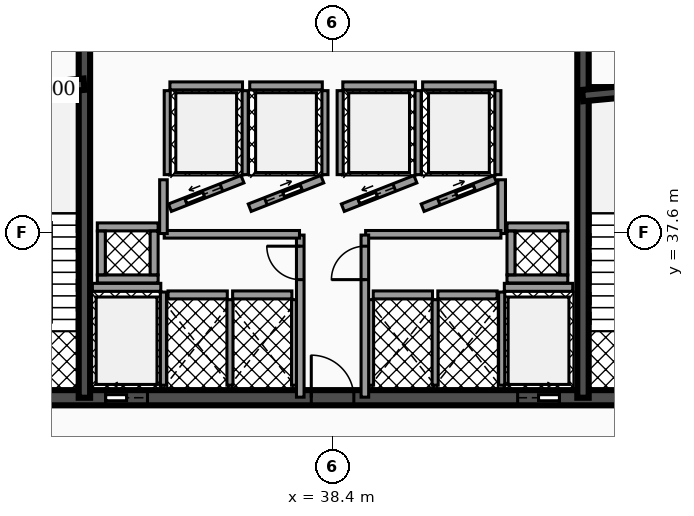
"""IFC4 building model, lengths in metres.
Left out: names, types, materials, properties, quantities, classifications, styles, units other than length and angle.
Written with IfcOpenShell. Run it as: python <this file> out.ifc"""

import sys

from ifc_helpers import new_model, si_unit, direction, frame, frame_2d, origin, place, context, subcontext, project, spatial, rectangle, extrude, element, fill, save


model = new_model("IFC4")
c1 = context("Model", 3, precision=1e-05, world=origin(), true_north=direction((0.0, 1.0)))
c2 = subcontext(c1, "Body", "Model", "MODEL_VIEW")
j1 = project(units=[si_unit("LENGTHUNIT", "METRE"), si_unit("PLANEANGLEUNIT", "RADIAN")], contexts=[c1])
p1 = place(None, origin())
s1 = spatial("IfcSite", under=j1, at=p1, CompositionType="ELEMENT")
p2 = place(p1, origin())
s2 = spatial("IfcBuilding", under=s1, at=p2, CompositionType="ELEMENT")
p3 = place(p2, frame((0.0, 0.0, 56.1)))
s3 = spatial("IfcBuildingStorey", under=s2, at=p3, CompositionType="ELEMENT", Elevation=56.1)
p4 = place(p3, frame((28.4, 33.25, 0.0), z_axis=(0.0, 0.0, 1.0), x_axis=(1.0, 0.0, 0.0)))
e1 = element("IfcWall", 1, at=p4, inside=s3, PredefinedType="SHEAR", context=c2, shape_type="SweptSolid", body=[
    extrude(rectangle(XDim=20.06, YDim=0.4, at=frame_2d((10.03, 0.0))), origin(), (0.0, 0.0, 1.0), 3.82),
])
p5 = place(p4, frame((4.03, 0.0, 0.0)))
e2 = element("IfcOpeningElement", 2, at=p5, cuts=e1, PredefinedType="OPENING", context=c2, shape_type="SweptSolid", body=[
    extrude(rectangle(XDim=1.1, YDim=2.15, at=frame_2d((0.55, 1.075))), frame((0.0, 0.21, 0.0), z_axis=(0.0, -1.0, 0.0), x_axis=(1.0, 0.0, 0.0)), (0.0, 0.0, 1.0), 0.42),
])
p6 = place(p4, frame((14.87, 0.0, 0.0)))
e3 = element("IfcOpeningElement", 3, at=p6, cuts=e1, PredefinedType="OPENING", context=c2, shape_type="SweptSolid", body=[
    extrude(rectangle(XDim=1.1, YDim=2.15, at=frame_2d((0.55, 1.075))), frame((0.0, 0.21, 0.0), z_axis=(0.0, -1.0, 0.0), x_axis=(1.0, 0.0, 0.0)), (0.0, 0.0, 1.0), 0.42),
])
p7 = place(p4, frame((1.31, 0.0, 0.0)))
e4 = element("IfcOpeningElement", 4, at=p7, cuts=e1, PredefinedType="OPENING", context=c2, shape_type="SweptSolid", body=[
    extrude(rectangle(XDim=1.1, YDim=2.2, at=frame_2d((0.55, 1.1))), frame((0.0, 0.21, 0.0), z_axis=(0.0, -1.0, 0.0), x_axis=(1.0, 0.0, 0.0)), (0.0, 0.0, 1.0), 0.42),
])
p8 = place(p4, frame((9.44, 0.0, 0.0)))
e5 = element("IfcOpeningElement", 5, at=p8, cuts=e1, PredefinedType="OPENING", context=c2, shape_type="SweptSolid", body=[
    extrude(rectangle(XDim=1.12, YDim=2.05, at=frame_2d((0.56, 1.025))), frame((0.0, 0.21, 0.0), z_axis=(0.0, -1.0, 0.0), x_axis=(1.0, 0.0, 0.0)), (0.0, 0.0, 1.0), 0.42),
])
p9 = place(p4, frame((17.65, 0.0, 0.0)))
e6 = element("IfcOpeningElement", 6, at=p9, cuts=e1, PredefinedType="OPENING", context=c2, shape_type="SweptSolid", body=[
    extrude(rectangle(XDim=1.1, YDim=2.2, at=frame_2d((0.55, 1.1))), frame((0.0, 0.21, 0.0), z_axis=(0.0, -1.0, 0.0), x_axis=(1.0, 0.0, 0.0)), (0.0, 0.0, 1.0), 0.42),
])
for number, where, z_axis, x_axis in (
    (7, (31.87, 33.25, 0.0), (0.0, 0.0, 1.0), (0.0, 1.0, 0.0)),
    (8, (44.99, 33.25, 0.0), (0.0, 0.0, 1.0), (0.0, 1.0, 0.0)),
):
    element("IfcWall", number, at=place(p3, frame(where, z_axis=z_axis, x_axis=x_axis)), inside=s3, PredefinedType="SHEAR", context=c2, shape_type="SweptSolid", body=[
        extrude(rectangle(XDim=10.2, YDim=0.3, at=frame_2d((5.1, 0.0))), origin(), (0.0, 0.0, 1.0), 3.82),
    ])
p10 = place(p3, frame((28.64, 41.2, 0.0), z_axis=(0.0, 0.0, 1.0), x_axis=(0.995687118776, 0.092774789157, 0.0)))
e9 = element("IfcWall", 9, at=p10, inside=s3, PredefinedType="SHEAR", context=c2, shape_type="SweptSolid", body=[
    extrude(rectangle(XDim=3.234, YDim=0.3, at=frame_2d((1.617, 0.0))), origin(), (0.0, 0.0, 1.0), 3.82),
])
p11 = place(p3, frame((44.98, 41.2, 0.0), z_axis=(0.0, 0.0, 1.0), x_axis=(0.995686468965, 0.09278176286, 0.0)))
e10 = element("IfcWall", 10, at=p11, inside=s3, PredefinedType="SHEAR", context=c2, shape_type="SweptSolid", body=[
    extrude(rectangle(XDim=3.234, YDim=0.3, at=frame_2d((1.617, 0.0))), origin(), (0.0, 0.0, 1.0), 3.82),
])
p12 = place(p3, frame((32.08, 36.155, 0.0), z_axis=(0.0, 0.0, 1.0), x_axis=(1.0, 0.0, 0.0)))
e11 = element("IfcWall", 11, at=p12, inside=s3, PredefinedType="SOLIDWALL", context=c2, shape_type="SweptSolid", body=[
    extrude(rectangle(XDim=1.8, YDim=0.21, at=frame_2d((0.9, 0.0))), origin(), (0.0, 0.0, 1.0), 2.792),
])
p13 = place(p3, frame((33.95, 33.58, 0.0), z_axis=(0.0, 0.0, 1.0), x_axis=(0.0, 1.0, 0.0)))
e12 = element("IfcWall", 12, at=p13, inside=s3, PredefinedType="SOLIDWALL", context=c2, shape_type="SweptSolid", body=[
    extrude(rectangle(XDim=2.45, YDim=0.16, at=frame_2d((1.225, 0.0))), origin(), (0.0, 0.0, 1.0), 2.792),
])
p14 = place(p3, frame((42.92, 36.155, 0.0), z_axis=(0.0, 0.0, 1.0), x_axis=(1.0, 0.0, 0.0)))
e13 = element("IfcWall", 13, at=p14, inside=s3, PredefinedType="SOLIDWALL", context=c2, shape_type="SweptSolid", body=[
    extrude(rectangle(XDim=1.8, YDim=0.21, at=frame_2d((0.9, 0.0))), origin(), (0.0, 0.0, 1.0), 2.792),
])
p15 = place(p3, frame((42.85, 33.58, 0.0), z_axis=(0.0, 0.0, 1.0), x_axis=(0.0, 1.0, 0.0)))
e14 = element("IfcWall", 14, at=p15, inside=s3, PredefinedType="SOLIDWALL", context=c2, shape_type="SweptSolid", body=[
    extrude(rectangle(XDim=2.45, YDim=0.16, at=frame_2d((1.225, 0.0))), origin(), (0.0, 0.0, 1.0), 2.792),
])
p16 = place(p3, frame((34.12, 38.25, 0.0), z_axis=(0.0, 0.0, 1.0), x_axis=(0.930804993012, 0.36551616241, 0.0)))
e15 = element("IfcWall", 15, at=p16, inside=s3, PredefinedType="SOLIDWALL", context=c2, shape_type="SweptSolid", body=[
    extrude(rectangle(XDim=2.052, YDim=0.21, at=frame_2d((1.026, 0.0))), origin(), (0.0, 0.0, 1.0), 2.792),
])
p17 = place(p16, frame((0.455, 0.0, 0.0)))
e16 = element("IfcOpeningElement", 16, at=p17, cuts=e15, PredefinedType="OPENING", context=c2, shape_type="SweptSolid", body=[
    extrude(rectangle(XDim=1.0, YDim=2.1, at=frame_2d((0.5, 1.05))), frame((0.0, 0.115, 0.0), z_axis=(0.0, -1.0, 0.0), x_axis=(1.0, 0.0, 0.0)), (0.0, 0.0, 1.0), 0.23),
])
p18 = place(p3, frame((34.12, 41.455, 0.0), z_axis=(0.0, 0.0, 1.0), x_axis=(1.0, 0.0, 0.0)))
e17 = element("IfcWall", 17, at=p18, inside=s3, PredefinedType="SOLIDWALL", context=c2, shape_type="SweptSolid", body=[
    extrude(rectangle(XDim=1.91, YDim=0.21, at=frame_2d((0.955, 0.0))), origin(), (0.0, 0.0, 1.0), 2.792),
])
for number, where, z_axis, x_axis in (
    (18, (34.05, 39.12, 0.0), (0.0, 0.0, 1.0), (0.0, 1.0, 0.0)),
    (19, (36.1, 39.12, 0.0), (0.0, 0.0, 1.0), (0.0, 1.0, 0.0)),
):
    element("IfcWall", number, at=place(p3, frame(where, z_axis=z_axis, x_axis=x_axis)), inside=s3, PredefinedType="SOLIDWALL", context=c2, shape_type="SweptSolid", body=[
        extrude(rectangle(XDim=2.21, YDim=0.16, at=frame_2d((1.105, 0.0))), origin(), (0.0, 0.0, 1.0), 2.792),
    ])
p19 = place(p3, frame((36.22, 38.25, 0.0), z_axis=(0.0, 0.0, 1.0), x_axis=(0.930804993012, 0.36551616241, 0.0)))
e20 = element("IfcWall", 20, at=p19, inside=s3, PredefinedType="SOLIDWALL", context=c2, shape_type="SweptSolid", body=[
    extrude(rectangle(XDim=2.052, YDim=0.21, at=frame_2d((1.026, 0.0))), origin(), (0.0, 0.0, 1.0), 2.792),
])
p20 = place(p19, frame((0.455, 0.0, 0.0)))
e21 = element("IfcOpeningElement", 21, at=p20, cuts=e20, PredefinedType="OPENING", context=c2, shape_type="SweptSolid", body=[
    extrude(rectangle(XDim=1.0, YDim=2.1, at=frame_2d((0.5, 1.05))), frame((0.0, 0.115, 0.0), z_axis=(0.0, -1.0, 0.0), x_axis=(1.0, 0.0, 0.0)), (0.0, 0.0, 1.0), 0.23),
])
p21 = place(p3, frame((36.22, 41.455, 0.0), z_axis=(0.0, 0.0, 1.0), x_axis=(1.0, 0.0, 0.0)))
e22 = element("IfcWall", 22, at=p21, inside=s3, PredefinedType="SOLIDWALL", context=c2, shape_type="SweptSolid", body=[
    extrude(rectangle(XDim=1.91, YDim=0.21, at=frame_2d((0.955, 0.0))), origin(), (0.0, 0.0, 1.0), 2.792),
])
p22 = place(p3, frame((38.2, 39.12, 0.0), z_axis=(0.0, 0.0, 1.0), x_axis=(0.0, 1.0, 0.0)))
e23 = element("IfcWall", 23, at=p22, inside=s3, PredefinedType="SOLIDWALL", context=c2, shape_type="SweptSolid", body=[
    extrude(rectangle(XDim=2.21, YDim=0.16, at=frame_2d((1.105, 0.0))), origin(), (0.0, 0.0, 1.0), 2.792),
])
p23 = place(p3, frame((38.67, 38.25, 0.0), z_axis=(0.0, 0.0, 1.0), x_axis=(0.930820886763, 0.3654756856, 0.0)))
e24 = element("IfcWall", 24, at=p23, inside=s3, PredefinedType="SOLIDWALL", context=c2, shape_type="SweptSolid", body=[
    extrude(rectangle(XDim=2.052, YDim=0.21, at=frame_2d((1.026, 0.0))), origin(), (0.0, 0.0, 1.0), 2.792),
])
p24 = place(p23, frame((0.455, 0.0, 0.0)))
e25 = element("IfcOpeningElement", 25, at=p24, cuts=e24, PredefinedType="OPENING", context=c2, shape_type="SweptSolid", body=[
    extrude(rectangle(XDim=1.0, YDim=2.1, at=frame_2d((0.5, 1.05))), frame((0.0, 0.115, 0.0), z_axis=(0.0, -1.0, 0.0), x_axis=(1.0, 0.0, 0.0)), (0.0, 0.0, 1.0), 0.23),
])
p25 = place(p3, frame((38.67, 41.455, 0.0), z_axis=(0.0, 0.0, 1.0), x_axis=(1.0, 0.0, 0.0)))
e26 = element("IfcWall", 26, at=p25, inside=s3, PredefinedType="SOLIDWALL", context=c2, shape_type="SweptSolid", body=[
    extrude(rectangle(XDim=1.91, YDim=0.21, at=frame_2d((0.955, 0.0))), origin(), (0.0, 0.0, 1.0), 2.792),
])
for number, where, z_axis, x_axis in (
    (27, (38.6, 39.12, 0.0), (0.0, 0.0, 1.0), (0.0, 1.0, 0.0)),
    (28, (40.65, 39.12, 0.0), (0.0, 0.0, 1.0), (0.0, 1.0, 0.0)),
):
    element("IfcWall", number, at=place(p3, frame(where, z_axis=z_axis, x_axis=x_axis)), inside=s3, PredefinedType="SOLIDWALL", context=c2, shape_type="SweptSolid", body=[
        extrude(rectangle(XDim=2.21, YDim=0.16, at=frame_2d((1.105, 0.0))), origin(), (0.0, 0.0, 1.0), 2.792),
    ])
p26 = place(p3, frame((40.77, 38.25, 0.0), z_axis=(0.0, 0.0, 1.0), x_axis=(0.930804993012, 0.36551616241, 0.0)))
e29 = element("IfcWall", 29, at=p26, inside=s3, PredefinedType="SOLIDWALL", context=c2, shape_type="SweptSolid", body=[
    extrude(rectangle(XDim=2.052, YDim=0.21, at=frame_2d((1.026, 0.0))), origin(), (0.0, 0.0, 1.0), 2.792),
])
p27 = place(p26, frame((0.455, 0.0, 0.0)))
e30 = element("IfcOpeningElement", 30, at=p27, cuts=e29, PredefinedType="OPENING", context=c2, shape_type="SweptSolid", body=[
    extrude(rectangle(XDim=1.0, YDim=2.1, at=frame_2d((0.5, 1.05))), frame((0.0, 0.115, 0.0), z_axis=(0.0, -1.0, 0.0), x_axis=(1.0, 0.0, 0.0)), (0.0, 0.0, 1.0), 0.23),
])
p28 = place(p3, frame((40.77, 41.455, 0.0), z_axis=(0.0, 0.0, 1.0), x_axis=(1.0, 0.0, 0.0)))
e31 = element("IfcWall", 31, at=p28, inside=s3, PredefinedType="SOLIDWALL", context=c2, shape_type="SweptSolid", body=[
    extrude(rectangle(XDim=1.91, YDim=0.21, at=frame_2d((0.955, 0.0))), origin(), (0.0, 0.0, 1.0), 2.792),
])
p29 = place(p3, frame((42.75, 39.12, 0.0), z_axis=(0.0, 0.0, 1.0), x_axis=(0.0, 1.0, 0.0)))
e32 = element("IfcWall", 32, at=p29, inside=s3, PredefinedType="SOLIDWALL", context=c2, shape_type="SweptSolid", body=[
    extrude(rectangle(XDim=2.21, YDim=0.16, at=frame_2d((1.105, 0.0))), origin(), (0.0, 0.0, 1.0), 2.792),
])
p30 = place(p3, frame((34.07, 35.955, 0.0), z_axis=(0.0, 0.0, 1.0), x_axis=(1.0, 0.0, 0.0)))
e33 = element("IfcWall", 33, at=p30, inside=s3, PredefinedType="SOLIDWALL", context=c2, shape_type="SweptSolid", body=[
    extrude(rectangle(XDim=1.56, YDim=0.21, at=frame_2d((0.78, 0.0))), origin(), (0.0, 0.0, 1.0), 2.792),
])
p31 = place(p3, frame((35.7, 33.58, 0.0), z_axis=(0.0, 0.0, 1.0), x_axis=(0.0, 1.0, 0.0)))
e34 = element("IfcWall", 34, at=p31, inside=s3, PredefinedType="SOLIDWALL", context=c2, shape_type="SweptSolid", body=[
    extrude(rectangle(XDim=2.25, YDim=0.16, at=frame_2d((1.125, 0.0))), origin(), (0.0, 0.0, 1.0), 2.792),
])
p32 = place(p3, frame((35.77, 35.955, 0.0), z_axis=(0.0, 0.0, 1.0), x_axis=(1.0, 0.0, 0.0)))
e35 = element("IfcWall", 35, at=p32, inside=s3, PredefinedType="SOLIDWALL", context=c2, shape_type="SweptSolid", body=[
    extrude(rectangle(XDim=1.56, YDim=0.21, at=frame_2d((0.78, 0.0))), origin(), (0.0, 0.0, 1.0), 2.792),
])
p33 = place(p3, frame((37.4, 33.58, 0.0), z_axis=(0.0, 0.0, 1.0), x_axis=(0.0, 1.0, 0.0)))
e36 = element("IfcWall", 36, at=p33, inside=s3, PredefinedType="SOLIDWALL", context=c2, shape_type="SweptSolid", body=[
    extrude(rectangle(XDim=2.25, YDim=0.16, at=frame_2d((1.125, 0.0))), origin(), (0.0, 0.0, 1.0), 2.792),
])
p34 = place(p3, frame((39.47, 35.955, 0.0), z_axis=(0.0, 0.0, 1.0), x_axis=(1.0, 0.0, 0.0)))
e37 = element("IfcWall", 37, at=p34, inside=s3, PredefinedType="SOLIDWALL", context=c2, shape_type="SweptSolid", body=[
    extrude(rectangle(XDim=1.56, YDim=0.21, at=frame_2d((0.78, 0.0))), origin(), (0.0, 0.0, 1.0), 2.792),
])
for number, where, z_axis, x_axis in (
    (38, (39.4, 33.58, 0.0), (0.0, 0.0, 1.0), (0.0, 1.0, 0.0)),
    (39, (41.1, 33.58, 0.0), (0.0, 0.0, 1.0), (0.0, 1.0, 0.0)),
):
    element("IfcWall", number, at=place(p3, frame(where, z_axis=z_axis, x_axis=x_axis)), inside=s3, PredefinedType="SOLIDWALL", context=c2, shape_type="SweptSolid", body=[
        extrude(rectangle(XDim=2.25, YDim=0.16, at=frame_2d((1.125, 0.0))), origin(), (0.0, 0.0, 1.0), 2.792),
    ])
p35 = place(p3, frame((41.17, 35.955, 0.0), z_axis=(0.0, 0.0, 1.0), x_axis=(1.0, 0.0, 0.0)))
e40 = element("IfcWall", 40, at=p35, inside=s3, PredefinedType="SOLIDWALL", context=c2, shape_type="SweptSolid", body=[
    extrude(rectangle(XDim=1.56, YDim=0.21, at=frame_2d((0.78, 0.0))), origin(), (0.0, 0.0, 1.0), 2.792),
])
for number, where, z_axis, x_axis in (
    (41, (32.21, 36.375, 0.0), (0.0, 0.0, 1.0), (1.0, 0.0, 0.0)),
    (42, (32.21, 37.745, 0.0), (0.0, 0.0, 1.0), (1.0, 0.0, 0.0)),
):
    element("IfcWall", number, at=place(p3, frame(where, z_axis=z_axis, x_axis=x_axis)), inside=s3, PredefinedType="SOLIDWALL", context=c2, shape_type="SweptSolid", body=[
        extrude(rectangle(XDim=1.6, YDim=0.21, at=frame_2d((0.8, 0.0))), origin(), (0.0, 0.0, 1.0), 3.82),
    ])
for number, where, z_axis, x_axis in (
    (43, (32.315, 36.485, 0.0), (0.0, 0.0, 1.0), (0.0, 1.0, 0.0)),
    (44, (33.705, 36.485, 0.0), (0.0, 0.0, 1.0), (0.0, 1.0, 0.0)),
):
    element("IfcWall", number, at=place(p3, frame(where, z_axis=z_axis, x_axis=x_axis)), inside=s3, PredefinedType="SOLIDWALL", context=c2, shape_type="SweptSolid", body=[
        extrude(rectangle(XDim=1.15, YDim=0.21, at=frame_2d((0.575, 0.0))), origin(), (0.0, 0.0, 1.0), 3.82),
    ])
for number, where, z_axis, x_axis in (
    (45, (42.99, 36.375, 0.0), (0.0, 0.0, 1.0), (1.0, 0.0, 0.0)),
    (46, (42.99, 37.745, 0.0), (0.0, 0.0, 1.0), (1.0, 0.0, 0.0)),
):
    element("IfcWall", number, at=place(p3, frame(where, z_axis=z_axis, x_axis=x_axis)), inside=s3, PredefinedType="SOLIDWALL", context=c2, shape_type="SweptSolid", body=[
        extrude(rectangle(XDim=1.6, YDim=0.21, at=frame_2d((0.8, 0.0))), origin(), (0.0, 0.0, 1.0), 3.82),
    ])
for number, where, z_axis, x_axis in (
    (47, (43.095, 36.485, 0.0), (0.0, 0.0, 1.0), (0.0, 1.0, 0.0)),
    (48, (44.485, 36.485, 0.0), (0.0, 0.0, 1.0), (0.0, 1.0, 0.0)),
):
    element("IfcWall", number, at=place(p3, frame(where, z_axis=z_axis, x_axis=x_axis)), inside=s3, PredefinedType="SOLIDWALL", context=c2, shape_type="SweptSolid", body=[
        extrude(rectangle(XDim=1.15, YDim=0.21, at=frame_2d((0.575, 0.0))), origin(), (0.0, 0.0, 1.0), 3.82),
    ])
p36 = place(p3, frame((37.55, 33.265, 0.0), z_axis=(0.0, 0.0, 1.0), x_axis=(0.0, 1.0, 0.0)))
e49 = element("IfcWall", 49, at=p36, inside=s3, PredefinedType="PARTITIONING", context=c2, shape_type="SweptSolid", body=[
    extrude(rectangle(XDim=4.265, YDim=0.2, at=frame_2d((2.133, 0.0))), origin(), (0.0, 0.0, 1.0), 2.777),
])
p37 = place(p36, frame((3.093, 0.0, 0.0)))
e50 = element("IfcOpeningElement", 50, at=p37, cuts=e49, PredefinedType="OPENING", context=c2, shape_type="SweptSolid", body=[
    extrude(rectangle(XDim=0.88, YDim=2.05, at=frame_2d((0.44, 1.025))), frame((0.0, 0.11, 0.0), z_axis=(0.0, -1.0, 0.0), x_axis=(1.0, 0.0, 0.0)), (0.0, 0.0, 1.0), 0.22),
])
p38 = place(p3, frame((33.97, 37.55, 0.0), z_axis=(0.0, 0.0, 1.0), x_axis=(1.0, 0.0, 0.0)))
e51 = element("IfcWall", 51, at=p38, inside=s3, PredefinedType="PARTITIONING", context=c2, shape_type="SweptSolid", body=[
    extrude(rectangle(XDim=3.56, YDim=0.2, at=frame_2d((1.78, 0.0))), origin(), (0.0, 0.0, 1.0), 2.777),
])
for number, where, z_axis, x_axis in (
    (52, (33.95, 37.57, 0.0), (0.0, 0.0, 1.0), (0.0, 1.0, 0.0)),
    (53, (42.85, 37.57, 0.0), (0.0, 0.0, 1.0), (0.0, 1.0, 0.0)),
):
    element("IfcWall", number, at=place(p3, frame(where, z_axis=z_axis, x_axis=x_axis)), inside=s3, PredefinedType="PARTITIONING", context=c2, shape_type="SweptSolid", body=[
        extrude(rectangle(XDim=1.415, YDim=0.2, at=frame_2d((0.708, 0.0))), origin(), (0.0, 0.0, 1.0), 2.777),
    ])
p39 = place(p3, frame((39.27, 37.55, 0.0), z_axis=(0.0, 0.0, 1.0), x_axis=(1.0, 0.0, 0.0)))
e54 = element("IfcWall", 54, at=p39, inside=s3, PredefinedType="PARTITIONING", context=c2, shape_type="SweptSolid", body=[
    extrude(rectangle(XDim=3.56, YDim=0.2, at=frame_2d((1.78, 0.0))), origin(), (0.0, 0.0, 1.0), 2.777),
])
p40 = place(p3, frame((39.25, 33.265, 0.0), z_axis=(0.0, 0.0, 1.0), x_axis=(0.0, 1.0, 0.0)))
e55 = element("IfcWall", 55, at=p40, inside=s3, PredefinedType="PARTITIONING", context=c2, shape_type="SweptSolid", body=[
    extrude(rectangle(XDim=4.265, YDim=0.2, at=frame_2d((2.133, 0.0))), origin(), (0.0, 0.0, 1.0), 2.777),
])
p41 = place(p40, frame((3.093, 0.0, 0.0)))
e56 = element("IfcOpeningElement", 56, at=p41, cuts=e55, PredefinedType="OPENING", context=c2, shape_type="SweptSolid", body=[
    extrude(rectangle(XDim=0.88, YDim=2.05, at=frame_2d((0.44, 1.025))), frame((0.0, 0.11, 0.0), z_axis=(0.0, -1.0, 0.0), x_axis=(1.0, 0.0, 0.0)), (0.0, 0.0, 1.0), 0.22),
])
p42 = place(p5, origin())
e57 = element("IfcDoor", 57, at=p42, inside=s3, OperationType="SLIDING_TO_LEFT", PredefinedType="DOOR", context=c2, shape_type="SweptSolid", body=[
    extrude(rectangle(XDim=1.1, YDim=2.15, at=frame_2d((0.55, 1.075))), frame((0.0, 0.025, 0.0), z_axis=(0.0, -1.0, 0.0), x_axis=(1.0, 0.0, 0.0)), (0.0, 0.0, 1.0), 0.05),
])
fill(e2, e57)
p43 = place(p6, origin())
e58 = element("IfcDoor", 58, at=p43, inside=s3, OperationType="SLIDING_TO_RIGHT", PredefinedType="DOOR", context=c2, shape_type="SweptSolid", body=[
    extrude(rectangle(XDim=1.1, YDim=2.15, at=frame_2d((0.55, 1.075))), frame((0.0, 0.025, 0.0), z_axis=(0.0, -1.0, 0.0), x_axis=(1.0, 0.0, 0.0)), (0.0, 0.0, 1.0), 0.05),
])
fill(e3, e58)
p44 = place(p17, origin())
e59 = element("IfcDoor", 59, at=p44, inside=s3, OperationType="SLIDING_TO_LEFT", PredefinedType="DOOR", context=c2, shape_type="SweptSolid", body=[
    extrude(rectangle(XDim=1.0, YDim=2.1, at=frame_2d((0.5, 1.05))), frame((0.0, 0.025, 0.0), z_axis=(0.0, -1.0, 0.0), x_axis=(1.0, 0.0, 0.0)), (0.0, 0.0, 1.0), 0.05),
])
fill(e16, e59)
p45 = place(p20, origin())
e60 = element("IfcDoor", 60, at=p45, inside=s3, OperationType="SLIDING_TO_RIGHT", PredefinedType="DOOR", context=c2, shape_type="SweptSolid", body=[
    extrude(rectangle(XDim=1.0, YDim=2.1, at=frame_2d((0.5, 1.05))), frame((0.0, 0.025, 0.0), z_axis=(0.0, -1.0, 0.0), x_axis=(1.0, 0.0, 0.0)), (0.0, 0.0, 1.0), 0.05),
])
fill(e21, e60)
p46 = place(p24, origin())
e61 = element("IfcDoor", 61, at=p46, inside=s3, OperationType="SLIDING_TO_LEFT", PredefinedType="DOOR", context=c2, shape_type="SweptSolid", body=[
    extrude(rectangle(XDim=1.0, YDim=2.1, at=frame_2d((0.5, 1.05))), frame((0.0, 0.025, 0.0), z_axis=(0.0, -1.0, 0.0), x_axis=(1.0, 0.0, 0.0)), (0.0, 0.0, 1.0), 0.05),
])
fill(e25, e61)
p47 = place(p27, origin())
e62 = element("IfcDoor", 62, at=p47, inside=s3, OperationType="SLIDING_TO_RIGHT", PredefinedType="DOOR", context=c2, shape_type="SweptSolid", body=[
    extrude(rectangle(XDim=1.0, YDim=2.1, at=frame_2d((0.5, 1.05))), frame((0.0, 0.025, 0.0), z_axis=(0.0, -1.0, 0.0), x_axis=(1.0, 0.0, 0.0)), (0.0, 0.0, 1.0), 0.05),
])
fill(e30, e62)
p48 = place(p8, origin())
e63 = element("IfcDoor", 63, at=p48, inside=s3, OperationType="SINGLE_SWING_LEFT", PredefinedType="DOOR", context=c2, shape_type="SweptSolid", body=[
    extrude(rectangle(XDim=1.12, YDim=2.05, at=frame_2d((0.56, 1.025))), frame((0.0, 0.025, 0.0), z_axis=(0.0, -1.0, 0.0), x_axis=(1.0, 0.0, 0.0)), (0.0, 0.0, 1.0), 0.05),
])
fill(e5, e63)
p49 = place(p37, origin())
e64 = element("IfcDoor", 64, at=p49, inside=s3, OperationType="SINGLE_SWING_RIGHT", PredefinedType="DOOR", context=c2, shape_type="SweptSolid", body=[
    extrude(rectangle(XDim=0.88, YDim=2.05, at=frame_2d((0.44, 1.025))), frame((0.0, 0.025, 0.0), z_axis=(0.0, -1.0, 0.0), x_axis=(1.0, 0.0, 0.0)), (0.0, 0.0, 1.0), 0.05),
])
fill(e50, e64)
p50 = place(p41, origin())
e65 = element("IfcDoor", 65, at=p50, inside=s3, OperationType="SINGLE_SWING_LEFT", PredefinedType="DOOR", context=c2, shape_type="SweptSolid", body=[
    extrude(rectangle(XDim=0.88, YDim=2.05, at=frame_2d((0.44, 1.025))), frame((0.0, 0.025, 0.0), z_axis=(0.0, -1.0, 0.0), x_axis=(1.0, 0.0, 0.0)), (0.0, 0.0, 1.0), 0.05),
])
fill(e56, e65)
save(model, sys.argv[1])
